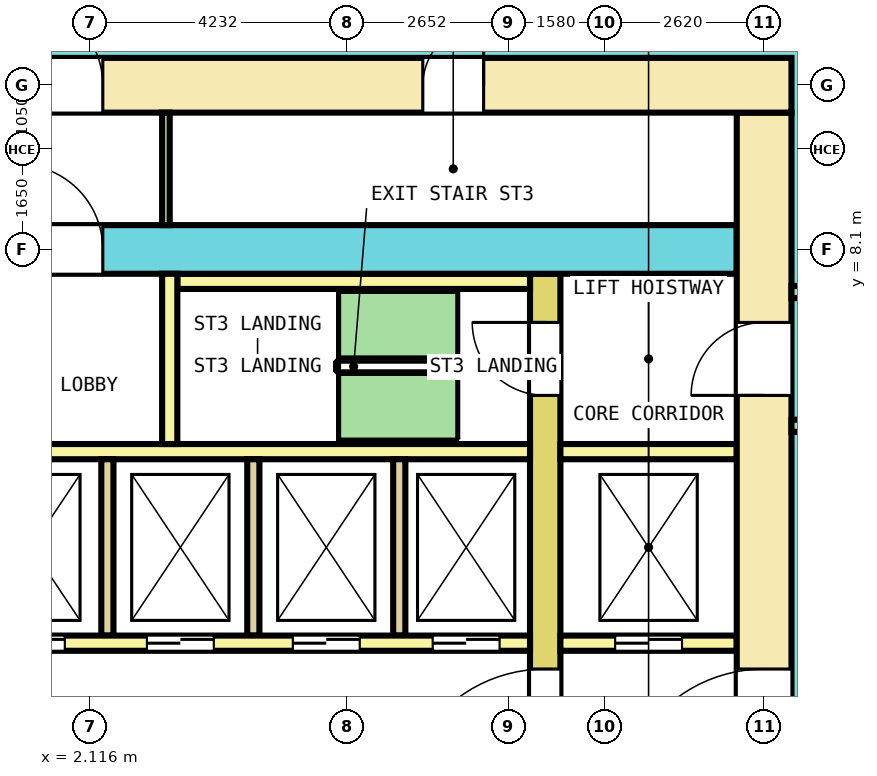
"""IFC4 building model, lengths in metres.
Left out: names, types, materials, properties, quantities, classifications, styles, units other than length and angle.
Written with IfcOpenShell. Run it as: python <this file> out.ifc"""

import sys

from ifc_helpers import new_model, si_unit, direction, frame, frame_2d, origin, place, context, subcontext, project, spatial, rectangle, extrude, element, fill, save


model = new_model("IFC4")
c1 = context("Model", 3, precision=1e-05, world=origin(), true_north=direction((0.0, 1.0)))
c2 = subcontext(c1, "Body", "Model", "MODEL_VIEW")
j1 = project(units=[si_unit("LENGTHUNIT", "METRE"), si_unit("PLANEANGLEUNIT", "RADIAN")], contexts=[c1])
p1 = place(None, origin())
s1 = spatial("IfcSite", under=j1, at=p1, CompositionType="ELEMENT")
p2 = place(p1, origin())
s2 = spatial("IfcBuilding", under=s1, at=p2, CompositionType="ELEMENT")
p3 = place(p2, origin())
s3 = spatial("IfcBuildingStorey", under=s2, at=p3, CompositionType="ELEMENT", Elevation=0.0)
p4 = place(p3, frame((-13.65, 10.8, 0.0), z_axis=(0.0, 0.0, 1.0), x_axis=(1.0, 0.0, 0.0)))
e1 = element("IfcWall", 1, at=p4, inside=s3, PredefinedType="SHEAR", context=c2, shape_type="SweptSolid", body=[
    extrude(rectangle(XDim=27.3, YDim=0.9, at=frame_2d((13.65, 0.0))), origin(), (0.0, 0.0, 1.0), 5.3),
])
p5 = place(p4, frame((1.892, 0.0, 0.0)))
e2 = element("IfcOpeningElement", 2, at=p5, cuts=e1, PredefinedType="OPENING", context=c2, shape_type="SweptSolid", body=[
    extrude(rectangle(XDim=1.0, YDim=2.1, at=frame_2d((0.5, 1.05))), frame((0.0, 0.46, 0.0), z_axis=(0.0, -1.0, 0.0), x_axis=(1.0, 0.0, 0.0)), (0.0, 0.0, 1.0), 0.92),
])
p6 = place(p4, frame((4.97, 0.0, 0.0)))
e3 = element("IfcOpeningElement", 3, at=p6, cuts=e1, PredefinedType="OPENING", context=c2, shape_type="SweptSolid", body=[
    extrude(rectangle(XDim=1.0, YDim=2.1, at=frame_2d((0.5, 1.05))), frame((0.0, 0.46, 0.0), z_axis=(0.0, -1.0, 0.0), x_axis=(1.0, 0.0, 0.0)), (0.0, 0.0, 1.0), 0.92),
])
p7 = place(p4, frame((8.017, 0.0, 0.0)))
e4 = element("IfcOpeningElement", 4, at=p7, cuts=e1, PredefinedType="OPENING", context=c2, shape_type="SweptSolid", body=[
    extrude(rectangle(XDim=1.0, YDim=2.1, at=frame_2d((0.5, 1.05))), frame((0.0, 0.46, 0.0), z_axis=(0.0, -1.0, 0.0), x_axis=(1.0, 0.0, 0.0)), (0.0, 0.0, 1.0), 0.92),
])
p8 = place(p4, frame((11.064, 0.0, 0.0)))
e5 = element("IfcOpeningElement", 5, at=p8, cuts=e1, PredefinedType="OPENING", context=c2, shape_type="SweptSolid", body=[
    extrude(rectangle(XDim=1.0, YDim=2.1, at=frame_2d((0.5, 1.05))), frame((0.0, 0.46, 0.0), z_axis=(0.0, -1.0, 0.0), x_axis=(1.0, 0.0, 0.0)), (0.0, 0.0, 1.0), 0.92),
])
p9 = place(p4, frame((21.238, 0.0, 0.0)))
e6 = element("IfcOpeningElement", 6, at=p9, cuts=e1, PredefinedType="OPENING", context=c2, shape_type="SweptSolid", body=[
    extrude(rectangle(XDim=1.0, YDim=2.1, at=frame_2d((0.5, 1.05))), frame((0.0, 0.46, 0.0), z_axis=(0.0, -1.0, 0.0), x_axis=(1.0, 0.0, 0.0)), (0.0, 0.0, 1.0), 0.92),
])
p10 = place(p4, frame((14.575, 0.0, 0.0)))
e7 = element("IfcOpeningElement", 7, at=p10, cuts=e1, PredefinedType="OPENING", context=c2, shape_type="SweptSolid", body=[
    extrude(rectangle(XDim=1.4, YDim=2.1, at=frame_2d((0.7, 1.05))), frame((0.0, 0.46, 0.0), z_axis=(0.0, -1.0, 0.0), x_axis=(1.0, 0.0, 0.0)), (0.0, 0.0, 1.0), 0.92),
])
p11 = place(p3, frame((13.2, -10.35, 0.0), z_axis=(0.0, 0.0, 1.0), x_axis=(0.0, 1.0, 0.0)))
e8 = element("IfcWall", 8, at=p11, inside=s3, PredefinedType="SHEAR", context=c2, shape_type="SweptSolid", body=[
    extrude(rectangle(XDim=20.7, YDim=0.9, at=frame_2d((10.35, 0.0))), origin(), (0.0, 0.0, 1.0), 5.3),
])
p12 = place(p11, frame((9.15, 0.0, 0.0)))
e9 = element("IfcOpeningElement", 9, at=p12, cuts=e8, PredefinedType="OPENING", context=c2, shape_type="SweptSolid", body=[
    extrude(rectangle(XDim=2.4, YDim=2.1, at=frame_2d((1.2, 1.05))), frame((0.0, 0.46, 0.0), z_axis=(0.0, -1.0, 0.0), x_axis=(1.0, 0.0, 0.0)), (0.0, 0.0, 1.0), 0.92),
])
p13 = place(p11, frame((16.05, 0.0, 0.0)))
e10 = element("IfcOpeningElement", 10, at=p13, cuts=e8, PredefinedType="OPENING", context=c2, shape_type="SweptSolid", body=[
    extrude(rectangle(XDim=1.2, YDim=2.1, at=frame_2d((0.6, 1.05))), frame((0.0, 0.46, 0.0), z_axis=(0.0, -1.0, 0.0), x_axis=(1.0, 0.0, 0.0)), (0.0, 0.0, 1.0), 0.92),
])
p14 = place(p11, frame((2.819, 0.0, 0.0)))
e11 = element("IfcOpeningElement", 11, at=p14, cuts=e8, PredefinedType="OPENING", context=c2, shape_type="SweptSolid", body=[
    extrude(rectangle(XDim=1.0, YDim=2.1, at=frame_2d((0.5, 1.05))), frame((0.0, 0.46, 0.0), z_axis=(0.0, -1.0, 0.0), x_axis=(1.0, 0.0, 0.0)), (0.0, 0.0, 1.0), 0.92),
])
p15 = place(p11, frame((4.281, 0.0, 0.0)))
e12 = element("IfcOpeningElement", 12, at=p15, cuts=e8, PredefinedType="OPENING", context=c2, shape_type="SweptSolid", body=[
    extrude(rectangle(XDim=1.0, YDim=2.1, at=frame_2d((0.5, 1.05))), frame((0.0, 0.46, 0.0), z_axis=(0.0, -1.0, 0.0), x_axis=(1.0, 0.0, 0.0)), (0.0, 0.0, 1.0), 0.92),
])
p16 = place(p3, frame((-12.75, 8.1, 0.0), z_axis=(0.0, 0.0, 1.0), x_axis=(1.0, 0.0, 0.0)))
e13 = element("IfcWall", 13, at=p16, inside=s3, PredefinedType="SHEAR", context=c2, shape_type="SweptSolid", body=[
    extrude(rectangle(XDim=25.5, YDim=0.8, at=frame_2d((12.75, 0.0))), origin(), (0.0, 0.0, 1.0), 5.3),
])
p17 = place(p16, frame((13.675, 0.0, 0.0)))
e14 = element("IfcOpeningElement", 14, at=p17, cuts=e13, PredefinedType="OPENING", context=c2, shape_type="SweptSolid", body=[
    extrude(rectangle(XDim=1.4, YDim=2.1, at=frame_2d((0.7, 1.05))), frame((0.0, 0.41, 0.0), z_axis=(0.0, -1.0, 0.0), x_axis=(1.0, 0.0, 0.0)), (0.0, 0.0, 1.0), 0.82),
])
p18 = place(p3, frame((9.6, -7.7, 0.0), z_axis=(0.0, 0.0, 1.0), x_axis=(0.0, 1.0, 0.0)))
e15 = element("IfcWall", 15, at=p18, inside=s3, PredefinedType="SHEAR", context=c2, shape_type="SweptSolid", body=[
    extrude(rectangle(XDim=15.4, YDim=0.5, at=frame_2d((7.7, 0.0))), origin(), (0.0, 0.0, 1.0), 5.3),
])
p19 = place(p18, frame((6.5, 0.0, 0.0)))
e16 = element("IfcOpeningElement", 16, at=p19, cuts=e15, PredefinedType="OPENING", context=c2, shape_type="SweptSolid", body=[
    extrude(rectangle(XDim=2.4, YDim=2.1, at=frame_2d((1.2, 1.05))), frame((0.0, 0.26, 0.0), z_axis=(0.0, -1.0, 0.0), x_axis=(1.0, 0.0, 0.0)), (0.0, 0.0, 1.0), 0.52),
])
p20 = place(p18, frame((13.4, 0.0, 0.0)))
e17 = element("IfcOpeningElement", 17, at=p20, cuts=e15, PredefinedType="OPENING", context=c2, shape_type="SweptSolid", body=[
    extrude(rectangle(XDim=1.2, YDim=2.1, at=frame_2d((0.6, 1.05))), frame((0.0, 0.26, 0.0), z_axis=(0.0, -1.0, 0.0), x_axis=(1.0, 0.0, 0.0)), (0.0, 0.0, 1.0), 0.52),
])
p21 = place(p18, frame((0.9, 0.0, 0.0)))
e18 = element("IfcOpeningElement", 18, at=p21, cuts=e15, PredefinedType="OPENING", context=c2, shape_type="SweptSolid", body=[
    extrude(rectangle(XDim=1.0, YDim=2.1, at=frame_2d((0.5, 1.05))), frame((0.0, 0.26, 0.0), z_axis=(0.0, -1.0, 0.0), x_axis=(1.0, 0.0, 0.0)), (0.0, 0.0, 1.0), 0.52),
])
p22 = place(p3, frame((-9.35, 1.625, 0.0), z_axis=(0.0, 0.0, 1.0), x_axis=(1.0, 0.0, 0.0)))
e19 = element("IfcWall", 19, at=p22, inside=s3, PredefinedType="SOLIDWALL", context=c2, shape_type="SweptSolid", body=[
    extrude(rectangle(XDim=18.7, YDim=0.25, at=frame_2d((9.35, 0.0))), origin(), (0.0, 0.0, 1.0), 5.3),
])
p23 = place(p22, frame((0.5, 0.0, 0.0)))
e20 = element("IfcOpeningElement", 20, at=p23, cuts=e19, PredefinedType="OPENING", context=c2, shape_type="SweptSolid", body=[
    extrude(rectangle(XDim=1.1, YDim=2.1, at=frame_2d((0.55, 1.05))), frame((0.0, 0.135, 0.0), z_axis=(0.0, -1.0, 0.0), x_axis=(1.0, 0.0, 0.0)), (0.0, 0.0, 1.0), 0.27),
])
p24 = place(p22, frame((2.85, 0.0, 0.0)))
e21 = element("IfcOpeningElement", 21, at=p24, cuts=e19, PredefinedType="OPENING", context=c2, shape_type="SweptSolid", body=[
    extrude(rectangle(XDim=1.1, YDim=2.1, at=frame_2d((0.55, 1.05))), frame((0.0, 0.135, 0.0), z_axis=(0.0, -1.0, 0.0), x_axis=(1.0, 0.0, 0.0)), (0.0, 0.0, 1.0), 0.27),
])
p25 = place(p22, frame((5.15, 0.0, 0.0)))
e22 = element("IfcOpeningElement", 22, at=p25, cuts=e19, PredefinedType="OPENING", context=c2, shape_type="SweptSolid", body=[
    extrude(rectangle(XDim=1.1, YDim=2.1, at=frame_2d((0.55, 1.05))), frame((0.0, 0.135, 0.0), z_axis=(0.0, -1.0, 0.0), x_axis=(1.0, 0.0, 0.0)), (0.0, 0.0, 1.0), 0.27),
])
p26 = place(p22, frame((7.65, 0.0, 0.0)))
e23 = element("IfcOpeningElement", 23, at=p26, cuts=e19, PredefinedType="OPENING", context=c2, shape_type="SweptSolid", body=[
    extrude(rectangle(XDim=1.1, YDim=2.1, at=frame_2d((0.55, 1.05))), frame((0.0, 0.135, 0.0), z_axis=(0.0, -1.0, 0.0), x_axis=(1.0, 0.0, 0.0)), (0.0, 0.0, 1.0), 0.27),
])
p27 = place(p22, frame((9.95, 0.0, 0.0)))
e24 = element("IfcOpeningElement", 24, at=p27, cuts=e19, PredefinedType="OPENING", context=c2, shape_type="SweptSolid", body=[
    extrude(rectangle(XDim=1.1, YDim=2.1, at=frame_2d((0.55, 1.05))), frame((0.0, 0.135, 0.0), z_axis=(0.0, -1.0, 0.0), x_axis=(1.0, 0.0, 0.0)), (0.0, 0.0, 1.0), 0.27),
])
p28 = place(p22, frame((12.4, 0.0, 0.0)))
e25 = element("IfcOpeningElement", 25, at=p28, cuts=e19, PredefinedType="OPENING", context=c2, shape_type="SweptSolid", body=[
    extrude(rectangle(XDim=1.1, YDim=2.1, at=frame_2d((0.55, 1.05))), frame((0.0, 0.135, 0.0), z_axis=(0.0, -1.0, 0.0), x_axis=(1.0, 0.0, 0.0)), (0.0, 0.0, 1.0), 0.27),
])
p29 = place(p22, frame((14.8, 0.0, 0.0)))
e26 = element("IfcOpeningElement", 26, at=p29, cuts=e19, PredefinedType="OPENING", context=c2, shape_type="SweptSolid", body=[
    extrude(rectangle(XDim=1.1, YDim=2.1, at=frame_2d((0.55, 1.05))), frame((0.0, 0.135, 0.0), z_axis=(0.0, -1.0, 0.0), x_axis=(1.0, 0.0, 0.0)), (0.0, 0.0, 1.0), 0.27),
])
p30 = place(p22, frame((17.1, 0.0, 0.0)))
e27 = element("IfcOpeningElement", 27, at=p30, cuts=e19, PredefinedType="OPENING", context=c2, shape_type="SweptSolid", body=[
    extrude(rectangle(XDim=1.1, YDim=2.1, at=frame_2d((0.55, 1.05))), frame((0.0, 0.135, 0.0), z_axis=(0.0, -1.0, 0.0), x_axis=(1.0, 0.0, 0.0)), (0.0, 0.0, 1.0), 0.27),
])
p31 = place(p3, frame((9.85, 1.625, 0.0), z_axis=(0.0, 0.0, 1.0), x_axis=(1.0, 0.0, 0.0)))
e28 = element("IfcWall", 28, at=p31, inside=s3, PredefinedType="SOLIDWALL", context=c2, shape_type="SweptSolid", body=[
    extrude(rectangle(XDim=2.9, YDim=0.25, at=frame_2d((1.45, 0.0))), origin(), (0.0, 0.0, 1.0), 5.3),
])
p32 = place(p31, frame((0.9, 0.0, 0.0)))
e29 = element("IfcOpeningElement", 29, at=p32, cuts=e28, PredefinedType="OPENING", context=c2, shape_type="SweptSolid", body=[
    extrude(rectangle(XDim=1.1, YDim=2.1, at=frame_2d((0.55, 1.05))), frame((0.0, 0.135, 0.0), z_axis=(0.0, -1.0, 0.0), x_axis=(1.0, 0.0, 0.0)), (0.0, 0.0, 1.0), 0.27),
])
p33 = place(p3, frame((-9.35, 4.775, 0.0), z_axis=(0.0, 0.0, 1.0), x_axis=(1.0, 0.0, 0.0)))
e30 = element("IfcWall", 30, at=p33, inside=s3, PredefinedType="SOLIDWALL", context=c2, shape_type="SweptSolid", body=[
    extrude(rectangle(XDim=18.7, YDim=0.25, at=frame_2d((9.35, 0.0))), origin(), (0.0, 0.0, 1.0), 5.3),
])
p34 = place(p3, frame((9.85, 4.775, 0.0), z_axis=(0.0, 0.0, 1.0), x_axis=(1.0, 0.0, 0.0)))
e31 = element("IfcWall", 31, at=p34, inside=s3, PredefinedType="SOLIDWALL", context=c2, shape_type="SweptSolid", body=[
    extrude(rectangle(XDim=2.9, YDim=0.25, at=frame_2d((1.45, 0.0))), origin(), (0.0, 0.0, 1.0), 5.3),
])
for number, where, z_axis, x_axis in (
    (32, (2.4, 1.75, 0.0), (0.0, 0.0, 1.0), (0.0, 1.0, 0.0)),
    (33, (4.8, 1.75, 0.0), (0.0, 0.0, 1.0), (0.0, 1.0, 0.0)),
    (34, (7.2, 1.75, 0.0), (0.0, 0.0, 1.0), (0.0, 1.0, 0.0)),
):
    element("IfcWall", number, at=place(p3, frame(where, z_axis=z_axis, x_axis=x_axis)), inside=s3, PredefinedType="SOLIDWALL", context=c2, shape_type="SweptSolid", body=[
        extrude(rectangle(XDim=2.9, YDim=0.2, at=frame_2d((1.45, 0.0))), origin(), (0.0, 0.0, 1.0), 5.3),
    ])
p35 = place(p3, frame((3.55, 7.575, 0.0), z_axis=(0.0, 0.0, 1.0), x_axis=(1.0, 0.0, 0.0)))
e35 = element("IfcWall", 35, at=p35, inside=s3, PredefinedType="SOLIDWALL", context=c2, shape_type="SweptSolid", body=[
    extrude(rectangle(XDim=5.8, YDim=0.25, at=frame_2d((2.9, 0.0))), origin(), (0.0, 0.0, 1.0), 5.3),
])
p36 = place(p3, frame((3.425, 4.9, 0.0), z_axis=(0.0, 0.0, 1.0), x_axis=(0.0, 1.0, 0.0)))
e36 = element("IfcWall", 36, at=p36, inside=s3, PredefinedType="SOLIDWALL", context=c2, shape_type="SweptSolid", body=[
    extrude(rectangle(XDim=2.8, YDim=0.25, at=frame_2d((1.4, 0.0))), origin(), (0.0, 0.0, 1.0), 5.3),
])
p37 = place(p3, frame((3.363, 8.5, 0.0), z_axis=(0.0, 0.0, 1.0), x_axis=(0.0, 1.0, 0.0)))
e37 = element("IfcWall", 37, at=p37, inside=s3, PredefinedType="PARTITIONING", context=c2, shape_type="SweptSolid", body=[
    extrude(rectangle(XDim=1.85, YDim=0.125, at=frame_2d((0.925, 0.0))), origin(), (0.0, 0.0, 1.0), 5.3),
])
p38 = place(p3, frame((13.65, 7.4, 0.0), z_axis=(0.0, 0.0, 1.0), x_axis=(1.0, 0.0, 0.0)))
e38 = element("IfcWall", 38, at=p38, inside=s3, PredefinedType="PARTITIONING", context=c2, shape_type="SweptSolid", body=[
    extrude(rectangle(XDim=4.077, YDim=0.2, at=frame_2d((2.038, 0.0))), origin(), (0.0, 0.0, 1.0), 4.2),
])
p39 = place(p38, frame((0.9, 0.0, 0.0)))
e39 = element("IfcOpeningElement", 39, at=p39, cuts=e38, PredefinedType="OPENING", context=c2, shape_type="SweptSolid", body=[
    extrude(rectangle(XDim=1.2, YDim=2.1, at=frame_2d((0.6, 1.05))), frame((0.0, 0.11, 0.0), z_axis=(0.0, -1.0, 0.0), x_axis=(1.0, 0.0, 0.0)), (0.0, 0.0, 1.0), 0.22),
])
p40 = place(p3, frame((13.65, 5.2, 0.0), z_axis=(0.0, 0.0, 1.0), x_axis=(1.0, 0.0, 0.0)))
e40 = element("IfcWall", 40, at=p40, inside=s3, PredefinedType="PARTITIONING", context=c2, shape_type="SweptSolid", body=[
    extrude(rectangle(XDim=3.223, YDim=0.2, at=frame_2d((1.612, 0.0))), origin(), (0.0, 0.0, 1.0), 4.2),
])
p41 = place(p40, frame((0.9, 0.0, 0.0)))
e41 = element("IfcOpeningElement", 41, at=p41, cuts=e40, PredefinedType="OPENING", context=c2, shape_type="SweptSolid", body=[
    extrude(rectangle(XDim=1.2, YDim=2.1, at=frame_2d((0.6, 1.05))), frame((0.0, 0.11, 0.0), z_axis=(0.0, -1.0, 0.0), x_axis=(1.0, 0.0, 0.0)), (0.0, 0.0, 1.0), 0.22),
])
p42 = place(p27, origin())
e42 = element("IfcDoor", 42, at=p42, inside=s3, OperationType="DOUBLE_DOOR_SLIDING", PredefinedType="DOOR", context=c2, shape_type="SweptSolid", body=[
    extrude(rectangle(XDim=1.1, YDim=2.1, at=frame_2d((0.55, 1.05))), frame((0.0, 0.075, 0.0), z_axis=(0.0, -1.0, 0.0), x_axis=(1.0, 0.0, 0.0)), (0.0, 0.0, 1.0), 0.15),
])
fill(e24, e42)
p43 = place(p28, origin())
e43 = element("IfcDoor", 43, at=p43, inside=s3, OperationType="DOUBLE_DOOR_SLIDING", PredefinedType="DOOR", context=c2, shape_type="SweptSolid", body=[
    extrude(rectangle(XDim=1.1, YDim=2.1, at=frame_2d((0.55, 1.05))), frame((0.0, 0.075, 0.0), z_axis=(0.0, -1.0, 0.0), x_axis=(1.0, 0.0, 0.0)), (0.0, 0.0, 1.0), 0.15),
])
fill(e25, e43)
p44 = place(p29, origin())
e44 = element("IfcDoor", 44, at=p44, inside=s3, OperationType="DOUBLE_DOOR_SLIDING", PredefinedType="DOOR", context=c2, shape_type="SweptSolid", body=[
    extrude(rectangle(XDim=1.1, YDim=2.1, at=frame_2d((0.55, 1.05))), frame((0.0, 0.075, 0.0), z_axis=(0.0, -1.0, 0.0), x_axis=(1.0, 0.0, 0.0)), (0.0, 0.0, 1.0), 0.15),
])
fill(e26, e44)
p45 = place(p30, origin())
e45 = element("IfcDoor", 45, at=p45, inside=s3, OperationType="DOUBLE_DOOR_SLIDING", PredefinedType="DOOR", context=c2, shape_type="SweptSolid", body=[
    extrude(rectangle(XDim=1.1, YDim=2.1, at=frame_2d((0.55, 1.05))), frame((0.0, 0.075, 0.0), z_axis=(0.0, -1.0, 0.0), x_axis=(1.0, 0.0, 0.0)), (0.0, 0.0, 1.0), 0.15),
])
fill(e27, e45)
p46 = place(p32, origin())
e46 = element("IfcDoor", 46, at=p46, inside=s3, OperationType="DOUBLE_DOOR_SLIDING", PredefinedType="DOOR", context=c2, shape_type="SweptSolid", body=[
    extrude(rectangle(XDim=1.1, YDim=2.1, at=frame_2d((0.55, 1.05))), frame((0.0, 0.075, 0.0), z_axis=(0.0, -1.0, 0.0), x_axis=(1.0, 0.0, 0.0)), (0.0, 0.0, 1.0), 0.15),
])
fill(e29, e46)
p47 = place(p19, origin())
e47 = element("IfcDoor", 47, at=p47, inside=s3, OperationType="DOUBLE_DOOR_SINGLE_SWING", PredefinedType="DOOR", context=c2, shape_type="SweptSolid", body=[
    extrude(rectangle(XDim=2.4, YDim=2.1, at=frame_2d((1.2, 1.05))), frame((0.0, 0.2, 0.0), z_axis=(0.0, -1.0, 0.0), x_axis=(1.0, 0.0, 0.0)), (0.0, 0.0, 1.0), 0.4),
])
fill(e16, e47)
p48 = place(p12, origin())
e48 = element("IfcDoor", 48, at=p48, inside=s3, OperationType="DOUBLE_DOOR_SINGLE_SWING", PredefinedType="DOOR", context=c2, shape_type="SweptSolid", body=[
    extrude(rectangle(XDim=2.4, YDim=2.1, at=frame_2d((1.2, 1.05))), frame((0.0, 0.3, 0.0), z_axis=(0.0, -1.0, 0.0), x_axis=(1.0, 0.0, 0.0)), (0.0, 0.0, 1.0), 0.6),
])
fill(e9, e48)
p49 = place(p20, origin())
e49 = element("IfcDoor", 49, at=p49, inside=s3, OperationType="SINGLE_SWING_LEFT", PredefinedType="DOOR", context=c2, shape_type="SweptSolid", body=[
    extrude(rectangle(XDim=1.2, YDim=2.1, at=frame_2d((0.6, 1.05))), frame((0.0, 0.2, 0.0), z_axis=(0.0, -1.0, 0.0), x_axis=(1.0, 0.0, 0.0)), (0.0, 0.0, 1.0), 0.4),
])
fill(e17, e49)
p50 = place(p13, origin())
e50 = element("IfcDoor", 50, at=p50, inside=s3, OperationType="SINGLE_SWING_RIGHT", PredefinedType="DOOR", context=c2, shape_type="SweptSolid", body=[
    extrude(rectangle(XDim=1.2, YDim=2.1, at=frame_2d((0.6, 1.05))), frame((0.0, 0.3, 0.0), z_axis=(0.0, -1.0, 0.0), x_axis=(1.0, 0.0, 0.0)), (0.0, 0.0, 1.0), 0.6),
])
fill(e10, e50)
p51 = place(p17, origin())
e51 = element("IfcDoor", 51, at=p51, inside=s3, OperationType="DOUBLE_DOOR_SINGLE_SWING", PredefinedType="DOOR", context=c2, shape_type="SweptSolid", body=[
    extrude(rectangle(XDim=1.4, YDim=2.1, at=frame_2d((0.7, 1.05))), frame((0.0, 0.3, 0.0), z_axis=(0.0, -1.0, 0.0), x_axis=(1.0, 0.0, 0.0)), (0.0, 0.0, 1.0), 0.6),
])
fill(e14, e51)
p52 = place(p9, origin())
e52 = element("IfcDoor", 52, at=p52, inside=s3, OperationType="SINGLE_SWING_RIGHT", PredefinedType="DOOR", context=c2, shape_type="SweptSolid", body=[
    extrude(rectangle(XDim=1.0, YDim=2.1, at=frame_2d((0.5, 1.05))), frame((0.0, 0.3, 0.0), z_axis=(0.0, -1.0, 0.0), x_axis=(1.0, 0.0, 0.0)), (0.0, 0.0, 1.0), 0.6),
])
fill(e6, e52)
p53 = place(p10, origin())
e53 = element("IfcDoor", 53, at=p53, inside=s3, OperationType="DOUBLE_DOOR_SINGLE_SWING", PredefinedType="DOOR", context=c2, shape_type="SweptSolid", body=[
    extrude(rectangle(XDim=1.4, YDim=2.1, at=frame_2d((0.7, 1.05))), frame((0.0, 0.3, 0.0), z_axis=(0.0, -1.0, 0.0), x_axis=(1.0, 0.0, 0.0)), (0.0, 0.0, 1.0), 0.6),
])
fill(e7, e53)
save(model, sys.argv[1])
